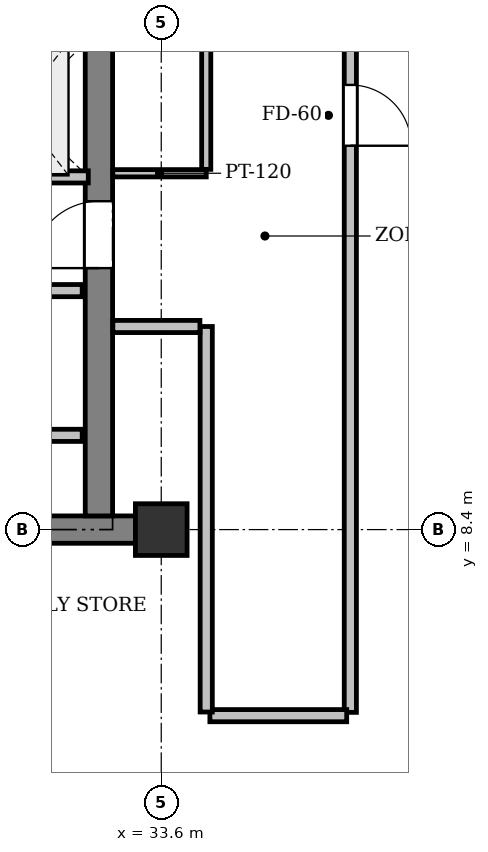
"""IFC4 building model, lengths in metres.
Left out: names, types, materials, properties, quantities, classifications, styles, units other than length and angle.
Written with IfcOpenShell. Run it as: python <this file> out.ifc"""

import sys

from ifc_helpers import new_model, si_unit, direction, frame, frame_2d, origin, origin_2d, place, context, subcontext, project, spatial, rectangle, extrude, element, fill, save


model = new_model("IFC4")
c1 = context("Model", 3, precision=1e-05, world=origin(), true_north=direction((0.0, 1.0)))
c2 = subcontext(c1, "Body", "Model", "MODEL_VIEW")
j1 = project(units=[si_unit("LENGTHUNIT", "METRE"), si_unit("PLANEANGLEUNIT", "RADIAN")], contexts=[c1])
p1 = place(None, origin())
s1 = spatial("IfcSite", under=j1, at=p1, CompositionType="ELEMENT")
p2 = place(p1, origin())
s2 = spatial("IfcBuilding", under=s1, at=p2, CompositionType="ELEMENT")
p3 = place(p2, frame((0.0, 0.0, 274.2)))
s3 = spatial("IfcBuildingStorey", under=s2, at=p3, CompositionType="ELEMENT", Elevation=274.2)
p4 = place(p3, frame((33.6, 8.4, 0.0), z_axis=(0.0, 0.0, 1.0), x_axis=(1.0, 0.0, 0.0)))
e1 = element("IfcColumn", 1, at=p4, inside=s3, PredefinedType="COLUMN", context=c2, shape_type="SweptSolid", body=[
    extrude(rectangle(XDim=0.85, YDim=0.85, at=origin_2d()), origin(), (0.0, 0.0, 1.0), 4.0),
])
p5 = place(p3, frame((25.625, 8.4, 0.0), z_axis=(0.0, 0.0, 1.0), x_axis=(1.0, 0.0, 0.0)))
e2 = element("IfcWall", 2, at=p5, inside=s3, PredefinedType="SHEAR", context=c2, shape_type="SweptSolid", body=[
    extrude(rectangle(XDim=7.55, YDim=0.45, at=frame_2d((3.775, 0.0))), origin(), (0.0, 0.0, 1.0), 3.725),
])
p6 = place(p3, frame((32.575, 8.625, 0.0), z_axis=(0.0, 0.0, 1.0), x_axis=(0.0, 1.0, 0.0)))
e3 = element("IfcWall", 3, at=p6, inside=s3, PredefinedType="SHEAR", context=c2, shape_type="SweptSolid", body=[
    extrude(rectangle(XDim=7.95, YDim=0.45, at=frame_2d((3.975, 0.0))), origin(), (0.0, 0.0, 1.0), 3.725),
])
p7 = place(p6, frame((4.075, 0.0, 0.0)))
e4 = element("IfcOpeningElement", 4, at=p7, cuts=e3, PredefinedType="OPENING", context=c2, shape_type="SweptSolid", body=[
    extrude(rectangle(XDim=1.1, YDim=2.15, at=frame_2d((0.55, 1.075))), frame((0.0, 0.235, 0.0), z_axis=(0.0, -1.0, 0.0), x_axis=(1.0, 0.0, 0.0)), (0.0, 0.0, 1.0), 0.47),
])
p8 = place(p3, frame((30.05, 14.2, 0.0), z_axis=(0.0, 0.0, 1.0), x_axis=(1.0, 0.0, 0.0)))
e5 = element("IfcWall", 5, at=p8, inside=s3, PredefinedType="PARTITIONING", context=c2, shape_type="SweptSolid", body=[
    extrude(rectangle(XDim=2.35, YDim=0.2, at=frame_2d((1.175, 0.0))), origin(), (0.0, 0.0, 1.0), 3.725),
])
p9 = place(p8, frame((0.625, 0.0, 0.0)))
e6 = element("IfcOpeningElement", 6, at=p9, cuts=e5, PredefinedType="OPENING", context=c2, shape_type="SweptSolid", body=[
    extrude(rectangle(XDim=1.1, YDim=2.2, at=frame_2d((0.55, 1.1))), frame((0.0, 0.11, 0.0), z_axis=(0.0, -1.0, 0.0), x_axis=(1.0, 0.0, 0.0)), (0.0, 0.0, 1.0), 0.22),
])
p10 = place(p3, frame((32.3, 12.33, 0.0), z_axis=(0.0, 0.0, 1.0), x_axis=(-1.0, 0.0, 0.0)))
e7 = element("IfcWall", 7, at=p10, inside=s3, PredefinedType="PARTITIONING", context=c2, shape_type="SweptSolid", body=[
    extrude(rectangle(XDim=2.45, YDim=0.2, at=frame_2d((1.225, 0.0))), origin(), (0.0, 0.0, 1.0), 3.725),
])
p11 = place(p10, frame((0.8, 0.0, 0.0)))
e8 = element("IfcOpeningElement", 8, at=p11, cuts=e7, PredefinedType="OPENING", context=c2, shape_type="SweptSolid", body=[
    extrude(rectangle(XDim=0.85, YDim=2.15, at=frame_2d((0.425, 1.075))), frame((0.0, 0.11, 0.0), z_axis=(0.0, -1.0, 0.0), x_axis=(1.0, 0.0, 0.0)), (0.0, 0.0, 1.0), 0.22),
])
p12 = place(p3, frame((29.85, 9.95, 0.0), z_axis=(0.0, 0.0, 1.0), x_axis=(1.0, 0.0, 0.0)))
e9 = element("IfcWall", 9, at=p12, inside=s3, PredefinedType="PARTITIONING", context=c2, shape_type="SweptSolid", body=[
    extrude(rectangle(XDim=2.45, YDim=0.2, at=frame_2d((1.225, 0.0))), origin(), (0.0, 0.0, 1.0), 3.725),
])
p13 = place(p3, frame((32.804, 14.26, 0.0), z_axis=(0.0, 0.0, 1.0), x_axis=(1.0, 0.0, 0.0)))
e10 = element("IfcWall", 10, at=p13, inside=s3, PredefinedType="PARTITIONING", context=c2, shape_type="SweptSolid", body=[
    extrude(rectangle(XDim=1.536, YDim=0.12, at=frame_2d((0.768, 0.0))), origin(), (0.0, 0.0, 1.0), 3.319),
])
p14 = place(p3, frame((34.34, 14.324, 0.0), z_axis=(0.0, 0.0, 1.0), x_axis=(0.0, 1.0, 0.0)))
e11 = element("IfcWall", 11, at=p14, inside=s3, PredefinedType="PARTITIONING", context=c2, shape_type="SweptSolid", body=[
    extrude(rectangle(XDim=8.466, YDim=0.15, at=frame_2d((4.233, 0.0))), origin(), (0.0, 0.0, 1.0), 3.271),
])
p15 = place(p3, frame((36.71, 25.031, 0.0), z_axis=(0.0, 0.0, 1.0), x_axis=(-1.2432708e-05, -0.999999999923, 0.0)))
e12 = element("IfcWall", 12, at=p15, inside=s3, PredefinedType="PARTITIONING", context=c2, shape_type="SweptSolid", body=[
    extrude(rectangle(XDim=19.637, YDim=0.2, at=frame_2d((9.818, 0.0))), origin(), (0.0, 0.0, 1.0), 3.271),
])
p16 = place(p15, frame((9.319, 0.0, 0.0)))
e13 = element("IfcOpeningElement", 13, at=p16, cuts=e12, PredefinedType="OPENING", context=c2, shape_type="SweptSolid", body=[
    extrude(rectangle(XDim=1.0, YDim=2.15, at=frame_2d((0.5, 1.075))), frame((0.0, 0.11, 0.0), z_axis=(0.0, -1.0, 0.0), x_axis=(1.0, 0.0, 0.0)), (0.0, 0.0, 1.0), 0.22),
])
p17 = place(p3, frame((36.65, 5.34, 0.0), z_axis=(0.0, 0.0, 1.0), x_axis=(-1.0, 0.0, 0.0)))
e14 = element("IfcWall", 14, at=p17, inside=s3, PredefinedType="PARTITIONING", context=c2, shape_type="SweptSolid", body=[
    extrude(rectangle(XDim=2.25, YDim=0.2, at=frame_2d((1.125, 0.0))), origin(), (0.0, 0.0, 1.0), 3.725),
])
p18 = place(p3, frame((34.34, 5.4, 0.0), z_axis=(0.0, 0.0, 1.0), x_axis=(0.0, 1.0, 0.0)))
e15 = element("IfcWall", 15, at=p18, inside=s3, PredefinedType="PARTITIONING", context=c2, shape_type="SweptSolid", body=[
    extrude(rectangle(XDim=6.34, YDim=0.2, at=frame_2d((3.17, 0.0))), origin(), (0.0, 0.0, 1.0), 3.271),
])
p19 = place(p3, frame((34.236, 11.74, 0.0), z_axis=(0.0, 0.0, 1.0), x_axis=(-1.0, 0.0, 0.0)))
e16 = element("IfcWall", 16, at=p19, inside=s3, PredefinedType="PARTITIONING", context=c2, shape_type="SweptSolid", body=[
    extrude(rectangle(XDim=1.432, YDim=0.2, at=frame_2d((0.716, 0.0))), origin(), (0.0, 0.0, 1.0), 3.319),
])
p20 = place(p7, origin())
e17 = element("IfcDoor", 17, at=p20, inside=s3, OperationType="SINGLE_SWING_LEFT", PredefinedType="DOOR", context=c2, shape_type="SweptSolid", body=[
    extrude(rectangle(XDim=1.1, YDim=2.15, at=frame_2d((0.55, 1.075))), frame((0.0, 0.025, 0.0), z_axis=(0.0, -1.0, 0.0), x_axis=(1.0, 0.0, 0.0)), (0.0, 0.0, 1.0), 0.05),
])
fill(e4, e17)
p21 = place(p16, origin())
e18 = element("IfcDoor", 18, at=p21, inside=s3, OperationType="SINGLE_SWING_RIGHT", PredefinedType="DOOR", context=c2, shape_type="SweptSolid", body=[
    extrude(rectangle(XDim=1.0, YDim=2.15, at=frame_2d((0.5, 1.075))), frame((0.0, 0.025, 0.0), z_axis=(0.0, -1.0, 0.0), x_axis=(1.0, 0.0, 0.0)), (0.0, 0.0, 1.0), 0.05),
])
fill(e13, e18)
save(model, sys.argv[1])
